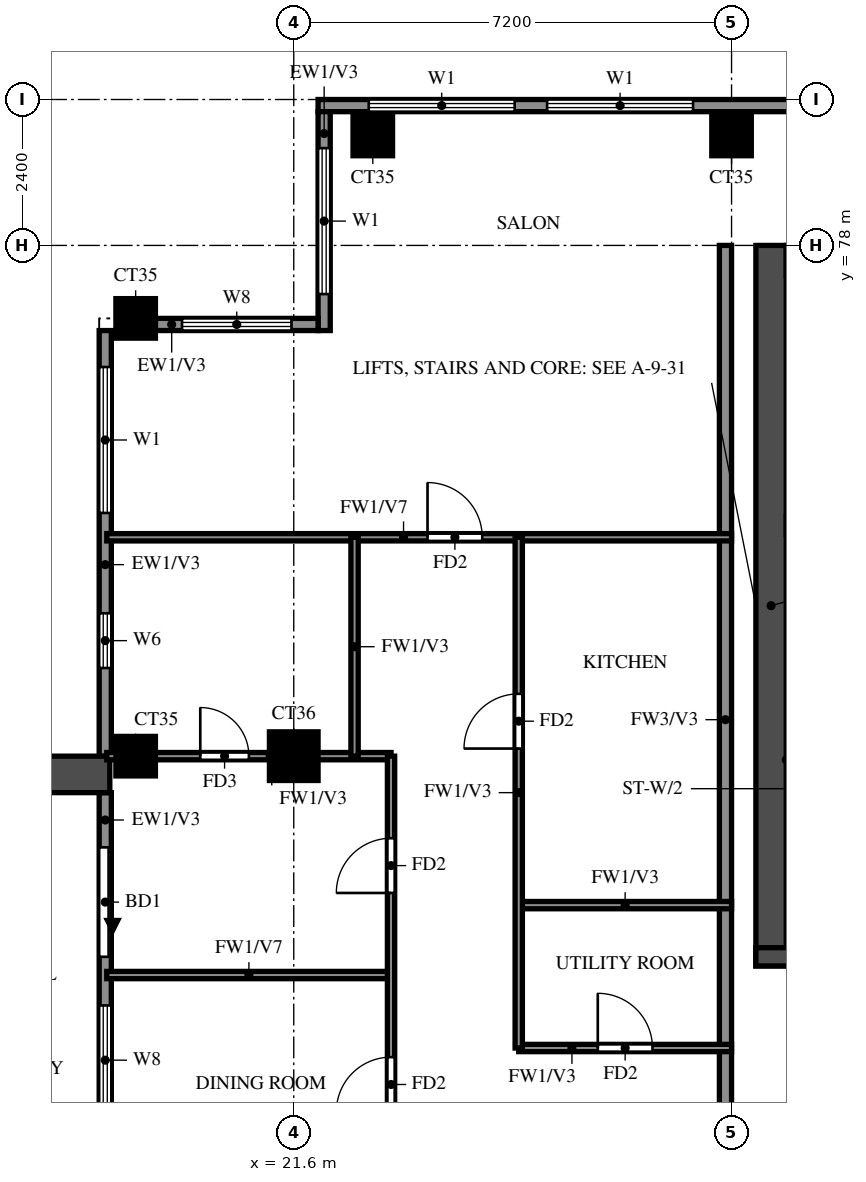
"""IFC4 building model, lengths in metres.
Left out: names, types, materials, properties, quantities, classifications, styles, units other than length and angle.
Written with IfcOpenShell. Run it as: python <this file> out.ifc"""

import sys

from ifc_helpers import new_model, si_unit, direction, frame, frame_2d, origin, origin_2d, place, context, subcontext, project, spatial, rectangle, extrude, source, transform, mapped, element, fill, save


model = new_model("IFC4")
c1 = context("Model", 3, precision=1e-05, world=origin(), true_north=direction((0.0, 1.0)))
c2 = subcontext(c1, "Body", "Model", "MODEL_VIEW")
j1 = project(units=[si_unit("LENGTHUNIT", "METRE"), si_unit("PLANEANGLEUNIT", "RADIAN")], contexts=[c1])
p1 = place(None, origin())
s1 = spatial("IfcSite", under=j1, at=p1, CompositionType="ELEMENT")
p2 = place(p1, origin())
s2 = spatial("IfcBuilding", under=s1, at=p2, CompositionType="ELEMENT")
p3 = place(p2, frame((0.0, 0.0, 246.5)))
s3 = spatial("IfcBuildingStorey", under=s2, at=p3, CompositionType="ELEMENT", Elevation=246.5)
m1 = source(origin(), c2, "Body", "SweptSolid", [
    extrude(rectangle(XDim=0.65, YDim=0.65, at=origin_2d()), origin(), (0.0, 0.0, 1.0), 3.22),
])
p4 = place(p3, frame((19.0, 69.6, 0.0), z_axis=(0.0, 0.0, 1.0), x_axis=(1.0, 0.0, 0.0)))
e1 = element("IfcColumn", 1, at=p4, inside=s3, PredefinedType="COLUMN", context=c2, shape_type="MappedRepresentation", body=[
    mapped(m1, transform((0.0, 0.0, 0.0))),
])
m2 = source(origin(), c2, "Body", "SweptSolid", [
    extrude(rectangle(XDim=0.8, YDim=0.8, at=origin_2d()), origin(), (0.0, 0.0, 1.0), 3.22),
])
p5 = place(p3, frame((21.6, 69.6, 0.0), z_axis=(0.0, 0.0, 1.0), x_axis=(1.0, 0.0, 0.0)))
e2 = element("IfcColumn", 2, at=p5, inside=s3, PredefinedType="COLUMN", context=c2, shape_type="MappedRepresentation", body=[
    mapped(m2, transform((0.0, 0.0, 0.0))),
])
for number, where, z_axis, x_axis in (
    (3, (19.0, 76.8, 0.0), (0.0, 0.0, 1.0), (1.0, 0.0, 0.0)),
    (4, (22.9, 79.8, 0.0), (0.0, 0.0, 1.0), (1.0, 0.0, 0.0)),
    (5, (28.8, 79.8, 0.0), (0.0, 0.0, 1.0), (1.0, 0.0, 0.0)),
):
    element("IfcColumn", number, at=place(p3, frame(where, z_axis=z_axis, x_axis=x_axis)), inside=s3, PredefinedType="COLUMN", context=c2, shape_type="MappedRepresentation", body=[
        mapped(m1, transform((0.0, 0.0, 0.0))),
    ])
p6 = place(p3, frame((29.45, 66.15, 0.0), z_axis=(0.0, 0.0, 1.0), x_axis=(0.0, 1.0, 0.0)))
e6 = element("IfcWall", 6, at=p6, inside=s3, PredefinedType="SHEAR", context=c2, shape_type="SweptSolid", body=[
    extrude(rectangle(XDim=11.85, YDim=0.5, at=frame_2d((5.925, 0.0))), origin(), (0.0, 0.0, 1.0), 3.22),
])
p7 = place(p3, frame((29.2, 66.3, 0.0), z_axis=(0.0, 0.0, 1.0), x_axis=(1.0, 0.0, 0.0)))
e7 = element("IfcWall", 7, at=p7, inside=s3, PredefinedType="SHEAR", context=c2, shape_type="SweptSolid", body=[
    extrude(rectangle(XDim=42.4, YDim=0.3, at=frame_2d((21.2, 0.0))), origin(), (0.0, 0.0, 1.0), 3.22),
])
p8 = place(p7, frame((1.425, 0.0, 0.0)))
e8 = element("IfcOpeningElement", 8, at=p8, cuts=e7, PredefinedType="OPENING", context=c2, shape_type="SweptSolid", body=[
    extrude(rectangle(XDim=1.1, YDim=2.1, at=frame_2d((0.55, 1.05))), frame((0.0, 0.16, 0.0), z_axis=(0.0, -1.0, 0.0), x_axis=(1.0, 0.0, 0.0)), (0.0, 0.0, 1.0), 0.32),
])
p9 = place(p7, frame((4.2, 0.0, 0.0)))
e9 = element("IfcOpeningElement", 9, at=p9, cuts=e7, PredefinedType="OPENING", context=c2, shape_type="SweptSolid", body=[
    extrude(rectangle(XDim=1.8, YDim=2.1, at=frame_2d((0.9, 1.05))), frame((0.0, 0.16, 0.0), z_axis=(0.0, -1.0, 0.0), x_axis=(1.0, 0.0, 0.0)), (0.0, 0.0, 1.0), 0.32),
])
p10 = place(p3, frame((78.6, 80.3, 0.0), z_axis=(0.0, 0.0, 1.0), x_axis=(-1.0, 0.0, 0.0)))
e10 = element("IfcWall", 10, at=p10, inside=s3, PredefinedType="SOLIDWALL", context=c2, shape_type="SweptSolid", body=[
    extrude(rectangle(XDim=56.6, YDim=0.2, at=frame_2d((28.3, 0.0))), origin(), (0.0, 0.0, 1.0), 3.22),
])
p11 = place(p10, frame((50.433, 0.0, 0.6)))
e11 = element("IfcOpeningElement", 11, at=p11, cuts=e10, PredefinedType="OPENING", context=c2, shape_type="SweptSolid", body=[
    extrude(rectangle(XDim=2.4, YDim=2.4, at=frame_2d((1.2, 1.2))), frame((0.0, 0.11, 0.0), z_axis=(0.0, -1.0, 0.0), x_axis=(1.0, 0.0, 0.0)), (0.0, 0.0, 1.0), 0.22),
])
p12 = place(p10, frame((53.367, 0.0, 0.6)))
e12 = element("IfcOpeningElement", 12, at=p12, cuts=e10, PredefinedType="OPENING", context=c2, shape_type="SweptSolid", body=[
    extrude(rectangle(XDim=2.4, YDim=2.4, at=frame_2d((1.2, 1.2))), frame((0.0, 0.11, 0.0), z_axis=(0.0, -1.0, 0.0), x_axis=(1.0, 0.0, 0.0)), (0.0, 0.0, 1.0), 0.22),
])
p13 = place(p10, frame((0.767, 0.0, 0.6)))
e13 = element("IfcOpeningElement", 13, at=p13, cuts=e10, PredefinedType="OPENING", context=c2, shape_type="SweptSolid", body=[
    extrude(rectangle(XDim=2.4, YDim=2.4, at=frame_2d((1.2, 1.2))), frame((0.0, 0.11, 0.0), z_axis=(0.0, -1.0, 0.0), x_axis=(1.0, 0.0, 0.0)), (0.0, 0.0, 1.0), 0.22),
])
p14 = place(p10, frame((3.633, 0.0, 0.6)))
e14 = element("IfcOpeningElement", 14, at=p14, cuts=e10, PredefinedType="OPENING", context=c2, shape_type="SweptSolid", body=[
    extrude(rectangle(XDim=2.4, YDim=2.4, at=frame_2d((1.2, 1.2))), frame((0.0, 0.11, 0.0), z_axis=(0.0, -1.0, 0.0), x_axis=(1.0, 0.0, 0.0)), (0.0, 0.0, 1.0), 0.22),
])
p15 = place(p3, frame((22.1, 80.2, 0.0), z_axis=(0.0, 0.0, 1.0), x_axis=(0.0, -1.0, 0.0)))
e15 = element("IfcWall", 15, at=p15, inside=s3, PredefinedType="SOLIDWALL", context=c2, shape_type="SweptSolid", body=[
    extrude(rectangle(XDim=3.6, YDim=0.2, at=frame_2d((1.8, 0.0))), origin(), (0.0, 0.0, 1.0), 3.22),
])
p16 = place(p15, frame((0.6, 0.0, 0.6)))
e16 = element("IfcOpeningElement", 16, at=p16, cuts=e15, PredefinedType="OPENING", context=c2, shape_type="SweptSolid", body=[
    extrude(rectangle(XDim=2.4, YDim=2.4, at=frame_2d((1.2, 1.2))), frame((0.0, 0.11, 0.0), z_axis=(0.0, -1.0, 0.0), x_axis=(1.0, 0.0, 0.0)), (0.0, 0.0, 1.0), 0.22),
])
p17 = place(p3, frame((22.0, 76.7, 0.0), z_axis=(0.0, 0.0, 1.0), x_axis=(-1.0, 0.0, 0.0)))
e17 = element("IfcWall", 17, at=p17, inside=s3, PredefinedType="SOLIDWALL", context=c2, shape_type="SweptSolid", body=[
    extrude(rectangle(XDim=2.675, YDim=0.2, at=frame_2d((1.337, 0.0))), origin(), (0.0, 0.0, 1.0), 3.22),
])
p18 = place(p17, frame((0.438, 0.0, 0.6)))
e18 = element("IfcOpeningElement", 18, at=p18, cuts=e17, PredefinedType="OPENING", context=c2, shape_type="SweptSolid", body=[
    extrude(rectangle(XDim=1.8, YDim=2.4, at=frame_2d((0.9, 1.2))), frame((0.0, 0.11, 0.0), z_axis=(0.0, -1.0, 0.0), x_axis=(1.0, 0.0, 0.0)), (0.0, 0.0, 1.0), 0.22),
])
p19 = place(p3, frame((18.5, 76.6, 0.0), z_axis=(0.0, 0.0, 1.0), x_axis=(0.0, -1.0, 0.0)))
e19 = element("IfcWall", 19, at=p19, inside=s3, PredefinedType="SOLIDWALL", context=c2, shape_type="SweptSolid", body=[
    extrude(rectangle(XDim=7.0, YDim=0.2, at=frame_2d((3.5, 0.0))), origin(), (0.0, 0.0, 1.0), 3.22),
])
p20 = place(p19, frame((4.65, 0.0, 1.5)))
e20 = element("IfcOpeningElement", 20, at=p20, cuts=e19, PredefinedType="OPENING", context=c2, shape_type="SweptSolid", body=[
    extrude(rectangle(XDim=0.9, YDim=0.9, at=frame_2d((0.45, 0.45))), frame((0.0, 0.11, 0.0), z_axis=(0.0, -1.0, 0.0), x_axis=(1.0, 0.0, 0.0)), (0.0, 0.0, 1.0), 0.22),
])
p21 = place(p19, frame((0.6, 0.0, 0.6)))
e21 = element("IfcOpeningElement", 21, at=p21, cuts=e19, PredefinedType="OPENING", context=c2, shape_type="SweptSolid", body=[
    extrude(rectangle(XDim=2.4, YDim=2.4, at=frame_2d((1.2, 1.2))), frame((0.0, 0.11, 0.0), z_axis=(0.0, -1.0, 0.0), x_axis=(1.0, 0.0, 0.0)), (0.0, 0.0, 1.0), 0.22),
])
p22 = place(p3, frame((18.5, 69.0, 0.0), z_axis=(0.0, 0.0, 1.0), x_axis=(0.0, -1.0, 0.0)))
e22 = element("IfcWall", 22, at=p22, inside=s3, PredefinedType="SOLIDWALL", context=c2, shape_type="SweptSolid", body=[
    extrude(rectangle(XDim=6.0, YDim=0.2, at=frame_2d((3.0, 0.0))), origin(), (0.0, 0.0, 1.0), 3.22),
])
p23 = place(p22, frame((0.9, 0.0, 0.0)))
e23 = element("IfcOpeningElement", 23, at=p23, cuts=e22, PredefinedType="OPENING", context=c2, shape_type="SweptSolid", body=[
    extrude(rectangle(XDim=1.8, YDim=2.4, at=frame_2d((0.9, 1.2))), frame((0.0, 0.11, 0.0), z_axis=(0.0, -1.0, 0.0), x_axis=(1.0, 0.0, 0.0)), (0.0, 0.0, 1.0), 0.22),
])
p24 = place(p22, frame((3.5, 0.0, 0.6)))
e24 = element("IfcOpeningElement", 24, at=p24, cuts=e22, PredefinedType="OPENING", context=c2, shape_type="SweptSolid", body=[
    extrude(rectangle(XDim=1.8, YDim=2.4, at=frame_2d((0.9, 1.2))), frame((0.0, 0.11, 0.0), z_axis=(0.0, -1.0, 0.0), x_axis=(1.0, 0.0, 0.0)), (0.0, 0.0, 1.0), 0.22),
])
p25 = place(p3, frame((18.575, 69.3, 0.0), z_axis=(0.0, 0.0, 1.0), x_axis=(-1.0, 0.0, 0.0)))
e25 = element("IfcWall", 25, at=p25, inside=s3, PredefinedType="SOLIDWALL", context=c2, shape_type="SweptSolid", body=[
    extrude(rectangle(XDim=2.875, YDim=0.6, at=frame_2d((1.438, 0.0))), origin(), (0.0, 0.0, 1.0), 2.85),
])
p26 = place(p3, frame((28.7, 62.4, 0.0), z_axis=(0.0, 0.0, 1.0), x_axis=(0.0, 1.0, 0.0)))
e26 = element("IfcWall", 26, at=p26, inside=s3, PredefinedType="SOLIDWALL", context=c2, shape_type="SweptSolid", body=[
    extrude(rectangle(XDim=15.6, YDim=0.2, at=frame_2d((7.8, 0.0))), origin(), (0.0, 0.0, 1.0), 3.22),
])
p27 = place(p3, frame((25.3, 64.8, 0.0), z_axis=(0.0, 0.0, 1.0), x_axis=(1.0, 0.0, 0.0)))
e27 = element("IfcWall", 27, at=p27, inside=s3, PredefinedType="PARTITIONING", context=c2, shape_type="SweptSolid", body=[
    extrude(rectangle(XDim=3.5, YDim=0.12, at=frame_2d((1.75, 0.0))), origin(), (0.0, 0.0, 1.0), 3.22),
])
p28 = place(p27, frame((1.3, 0.0, 0.0)))
e28 = element("IfcOpeningElement", 28, at=p28, cuts=e27, PredefinedType="OPENING", context=c2, shape_type="SweptSolid", body=[
    extrude(rectangle(XDim=0.9, YDim=2.1, at=frame_2d((0.45, 1.05))), frame((0.0, 0.07, 0.0), z_axis=(0.0, -1.0, 0.0), x_axis=(1.0, 0.0, 0.0)), (0.0, 0.0, 1.0), 0.14),
])
p29 = place(p3, frame((18.525, 66.0, 0.0), z_axis=(0.0, 0.0, 1.0), x_axis=(1.0, 0.0, 0.0)))
e29 = element("IfcWall", 29, at=p29, inside=s3, PredefinedType="PARTITIONING", context=c2, shape_type="SweptSolid", body=[
    extrude(rectangle(XDim=4.675, YDim=0.12, at=frame_2d((2.337, 0.0))), origin(), (0.0, 0.0, 1.0), 2.32),
])
p30 = place(p3, frame((25.3, 67.15, 0.0), z_axis=(0.0, 0.0, 1.0), x_axis=(1.0, 0.0, 0.0)))
e30 = element("IfcWall", 30, at=p30, inside=s3, PredefinedType="PARTITIONING", context=c2, shape_type="SweptSolid", body=[
    extrude(rectangle(XDim=3.5, YDim=0.12, at=frame_2d((1.75, 0.0))), origin(), (0.0, 0.0, 1.0), 3.22),
])
p31 = place(p3, frame((18.525, 69.6, 0.0), z_axis=(0.0, 0.0, 1.0), x_axis=(1.0, 0.0, 0.0)))
e31 = element("IfcWall", 31, at=p31, inside=s3, PredefinedType="PARTITIONING", context=c2, shape_type="SweptSolid", body=[
    extrude(rectangle(XDim=4.675, YDim=0.12, at=frame_2d((2.337, 0.0))), origin(), (0.0, 0.0, 1.0), 3.22),
])
p32 = place(p31, frame((1.538, 0.0, 0.0)))
e32 = element("IfcOpeningElement", 32, at=p32, cuts=e31, PredefinedType="OPENING", context=c2, shape_type="SweptSolid", body=[
    extrude(rectangle(XDim=0.8, YDim=2.1, at=frame_2d((0.4, 1.05))), frame((0.0, 0.07, 0.0), z_axis=(0.0, -1.0, 0.0), x_axis=(1.0, 0.0, 0.0)), (0.0, 0.0, 1.0), 0.14),
])
p33 = place(p3, frame((18.525, 73.2, 0.0), z_axis=(0.0, 0.0, 1.0), x_axis=(1.0, 0.0, 0.0)))
e33 = element("IfcWall", 33, at=p33, inside=s3, PredefinedType="PARTITIONING", context=c2, shape_type="SweptSolid", body=[
    extrude(rectangle(XDim=10.275, YDim=0.12, at=frame_2d((5.138, 0.0))), origin(), (0.0, 0.0, 1.0), 2.32),
])
p34 = place(p33, frame((5.275, 0.0, 0.0)))
e34 = element("IfcOpeningElement", 34, at=p34, cuts=e33, PredefinedType="OPENING", context=c2, shape_type="SweptSolid", body=[
    extrude(rectangle(XDim=0.9, YDim=2.1, at=frame_2d((0.45, 1.05))), frame((0.0, 0.07, 0.0), z_axis=(0.0, -1.0, 0.0), x_axis=(1.0, 0.0, 0.0)), (0.0, 0.0, 1.0), 0.14),
])
p35 = place(p3, frame((22.6, 69.6, 0.0), z_axis=(0.0, 0.0, 1.0), x_axis=(0.0, 1.0, 0.0)))
e35 = element("IfcWall", 35, at=p35, inside=s3, PredefinedType="PARTITIONING", context=c2, shape_type="SweptSolid", body=[
    extrude(rectangle(XDim=3.6, YDim=0.12, at=frame_2d((1.8, 0.0))), origin(), (0.0, 0.0, 1.0), 3.22),
])
p36 = place(p3, frame((23.2, 48.0, 0.0), z_axis=(0.0, 0.0, 1.0), x_axis=(0.0, 1.0, 0.0)))
e36 = element("IfcWall", 36, at=p36, inside=s3, PredefinedType="PARTITIONING", context=c2, shape_type="SweptSolid", body=[
    extrude(rectangle(XDim=21.6, YDim=0.12, at=frame_2d((10.8, 0.0))), origin(), (0.0, 0.0, 1.0), 3.22),
])
p37 = place(p36, frame((1.35, 0.0, 0.0)))
e37 = element("IfcOpeningElement", 37, at=p37, cuts=e36, PredefinedType="OPENING", context=c2, shape_type="SweptSolid", body=[
    extrude(rectangle(XDim=0.9, YDim=2.1, at=frame_2d((0.45, 1.05))), frame((0.0, 0.07, 0.0), z_axis=(0.0, -1.0, 0.0), x_axis=(1.0, 0.0, 0.0)), (0.0, 0.0, 1.0), 0.14),
])
p38 = place(p36, frame((7.95, 0.0, 0.0)))
e38 = element("IfcOpeningElement", 38, at=p38, cuts=e36, PredefinedType="OPENING", context=c2, shape_type="SweptSolid", body=[
    extrude(rectangle(XDim=1.5, YDim=2.1, at=frame_2d((0.75, 1.05))), frame((0.0, 0.07, 0.0), z_axis=(0.0, -1.0, 0.0), x_axis=(1.0, 0.0, 0.0)), (0.0, 0.0, 1.0), 0.14),
])
p39 = place(p36, frame((12.15, 0.0, 0.0)))
e39 = element("IfcOpeningElement", 39, at=p39, cuts=e36, PredefinedType="OPENING", context=c2, shape_type="SweptSolid", body=[
    extrude(rectangle(XDim=0.9, YDim=2.1, at=frame_2d((0.45, 1.05))), frame((0.0, 0.07, 0.0), z_axis=(0.0, -1.0, 0.0), x_axis=(1.0, 0.0, 0.0)), (0.0, 0.0, 1.0), 0.14),
])
p40 = place(p36, frame((15.75, 0.0, 0.0)))
e40 = element("IfcOpeningElement", 40, at=p40, cuts=e36, PredefinedType="OPENING", context=c2, shape_type="SweptSolid", body=[
    extrude(rectangle(XDim=0.9, YDim=2.1, at=frame_2d((0.45, 1.05))), frame((0.0, 0.07, 0.0), z_axis=(0.0, -1.0, 0.0), x_axis=(1.0, 0.0, 0.0)), (0.0, 0.0, 1.0), 0.14),
])
p41 = place(p36, frame((19.35, 0.0, 0.0)))
e41 = element("IfcOpeningElement", 41, at=p41, cuts=e36, PredefinedType="OPENING", context=c2, shape_type="SweptSolid", body=[
    extrude(rectangle(XDim=0.9, YDim=2.1, at=frame_2d((0.45, 1.05))), frame((0.0, 0.07, 0.0), z_axis=(0.0, -1.0, 0.0), x_axis=(1.0, 0.0, 0.0)), (0.0, 0.0, 1.0), 0.14),
])
p42 = place(p3, frame((25.3, 64.8, 0.0), z_axis=(0.0, 0.0, 1.0), x_axis=(0.0, 1.0, 0.0)))
e42 = element("IfcWall", 42, at=p42, inside=s3, PredefinedType="PARTITIONING", context=c2, shape_type="SweptSolid", body=[
    extrude(rectangle(XDim=8.4, YDim=0.12, at=frame_2d((4.2, 0.0))), origin(), (0.0, 0.0, 1.0), 3.22),
])
p43 = place(p42, frame((4.925, 0.0, 0.0)))
e43 = element("IfcOpeningElement", 43, at=p43, cuts=e42, PredefinedType="OPENING", context=c2, shape_type="SweptSolid", body=[
    extrude(rectangle(XDim=0.9, YDim=2.1, at=frame_2d((0.45, 1.05))), frame((0.0, 0.07, 0.0), z_axis=(0.0, -1.0, 0.0), x_axis=(1.0, 0.0, 0.0)), (0.0, 0.0, 1.0), 0.14),
])
p44 = place(p11, origin())
e44 = element("IfcWindow", 44, at=p44, inside=s3, PartitioningType="DOUBLE_PANEL_VERTICAL", PredefinedType="WINDOW", context=c2, shape_type="SweptSolid", body=[
    extrude(rectangle(XDim=2.4, YDim=2.4, at=frame_2d((1.2, 1.2))), frame((0.0, 0.03, 0.0), z_axis=(0.0, -1.0, 0.0), x_axis=(1.0, 0.0, 0.0)), (0.0, 0.0, 1.0), 0.06),
])
fill(e11, e44)
p45 = place(p12, origin())
e45 = element("IfcWindow", 45, at=p45, inside=s3, PartitioningType="DOUBLE_PANEL_VERTICAL", PredefinedType="WINDOW", context=c2, shape_type="SweptSolid", body=[
    extrude(rectangle(XDim=2.4, YDim=2.4, at=frame_2d((1.2, 1.2))), frame((0.0, 0.03, 0.0), z_axis=(0.0, -1.0, 0.0), x_axis=(1.0, 0.0, 0.0)), (0.0, 0.0, 1.0), 0.06),
])
fill(e12, e45)
p46 = place(p16, origin())
e46 = element("IfcWindow", 46, at=p46, inside=s3, PartitioningType="DOUBLE_PANEL_VERTICAL", PredefinedType="WINDOW", context=c2, shape_type="SweptSolid", body=[
    extrude(rectangle(XDim=2.4, YDim=2.4, at=frame_2d((1.2, 1.2))), frame((0.0, 0.03, 0.0), z_axis=(0.0, -1.0, 0.0), x_axis=(1.0, 0.0, 0.0)), (0.0, 0.0, 1.0), 0.06),
])
fill(e16, e46)
p47 = place(p18, origin())
e47 = element("IfcWindow", 47, at=p47, inside=s3, PartitioningType="DOUBLE_PANEL_VERTICAL", PredefinedType="WINDOW", context=c2, shape_type="SweptSolid", body=[
    extrude(rectangle(XDim=1.8, YDim=2.4, at=frame_2d((0.9, 1.2))), frame((0.0, 0.03, 0.0), z_axis=(0.0, -1.0, 0.0), x_axis=(1.0, 0.0, 0.0)), (0.0, 0.0, 1.0), 0.06),
])
fill(e18, e47)
p48 = place(p20, origin())
e48 = element("IfcWindow", 48, at=p48, inside=s3, PartitioningType="SINGLE_PANEL", PredefinedType="WINDOW", context=c2, shape_type="SweptSolid", body=[
    extrude(rectangle(XDim=0.9, YDim=0.9, at=frame_2d((0.45, 0.45))), frame((0.0, 0.03, 0.0), z_axis=(0.0, -1.0, 0.0), x_axis=(1.0, 0.0, 0.0)), (0.0, 0.0, 1.0), 0.06),
])
fill(e20, e48)
p49 = place(p21, origin())
e49 = element("IfcWindow", 49, at=p49, inside=s3, PartitioningType="DOUBLE_PANEL_VERTICAL", PredefinedType="WINDOW", context=c2, shape_type="SweptSolid", body=[
    extrude(rectangle(XDim=2.4, YDim=2.4, at=frame_2d((1.2, 1.2))), frame((0.0, 0.03, 0.0), z_axis=(0.0, -1.0, 0.0), x_axis=(1.0, 0.0, 0.0)), (0.0, 0.0, 1.0), 0.06),
])
fill(e21, e49)
p50 = place(p23, origin())
e50 = element("IfcDoor", 50, at=p50, inside=s3, OperationType="DOUBLE_DOOR_SLIDING", PredefinedType="DOOR", context=c2, shape_type="SweptSolid", body=[
    extrude(rectangle(XDim=1.8, YDim=2.4, at=frame_2d((0.9, 1.2))), frame((0.0, 0.025, 0.0), z_axis=(0.0, -1.0, 0.0), x_axis=(1.0, 0.0, 0.0)), (0.0, 0.0, 1.0), 0.05),
])
fill(e23, e50)
p51 = place(p24, origin())
e51 = element("IfcWindow", 51, at=p51, inside=s3, PartitioningType="DOUBLE_PANEL_VERTICAL", PredefinedType="WINDOW", context=c2, shape_type="SweptSolid", body=[
    extrude(rectangle(XDim=1.8, YDim=2.4, at=frame_2d((0.9, 1.2))), frame((0.0, 0.03, 0.0), z_axis=(0.0, -1.0, 0.0), x_axis=(1.0, 0.0, 0.0)), (0.0, 0.0, 1.0), 0.06),
])
fill(e24, e51)
p52 = place(p40, origin())
e52 = element("IfcDoor", 52, at=p52, inside=s3, OperationType="SINGLE_SWING_RIGHT", PredefinedType="DOOR", context=c2, shape_type="SweptSolid", body=[
    extrude(rectangle(XDim=0.9, YDim=2.1, at=frame_2d((0.45, 1.05))), frame((0.0, 0.025, 0.0), z_axis=(0.0, -1.0, 0.0), x_axis=(1.0, 0.0, 0.0)), (0.0, 0.0, 1.0), 0.05),
])
fill(e40, e52)
p53 = place(p41, origin())
e53 = element("IfcDoor", 53, at=p53, inside=s3, OperationType="SINGLE_SWING_LEFT", PredefinedType="DOOR", context=c2, shape_type="SweptSolid", body=[
    extrude(rectangle(XDim=0.9, YDim=2.1, at=frame_2d((0.45, 1.05))), frame((0.0, 0.025, 0.0), z_axis=(0.0, -1.0, 0.0), x_axis=(1.0, 0.0, 0.0)), (0.0, 0.0, 1.0), 0.05),
])
fill(e41, e53)
p54 = place(p32, origin())
e54 = element("IfcDoor", 54, at=p54, inside=s3, OperationType="SINGLE_SWING_RIGHT", PredefinedType="DOOR", context=c2, shape_type="SweptSolid", body=[
    extrude(rectangle(XDim=0.8, YDim=2.1, at=frame_2d((0.4, 1.05))), frame((0.0, 0.025, 0.0), z_axis=(0.0, -1.0, 0.0), x_axis=(1.0, 0.0, 0.0)), (0.0, 0.0, 1.0), 0.05),
])
fill(e32, e54)
p55 = place(p34, origin())
e55 = element("IfcDoor", 55, at=p55, inside=s3, OperationType="SINGLE_SWING_RIGHT", PredefinedType="DOOR", context=c2, shape_type="SweptSolid", body=[
    extrude(rectangle(XDim=0.9, YDim=2.1, at=frame_2d((0.45, 1.05))), frame((0.0, 0.025, 0.0), z_axis=(0.0, -1.0, 0.0), x_axis=(1.0, 0.0, 0.0)), (0.0, 0.0, 1.0), 0.05),
])
fill(e34, e55)
p56 = place(p28, origin())
e56 = element("IfcDoor", 56, at=p56, inside=s3, OperationType="SINGLE_SWING_LEFT", PredefinedType="DOOR", context=c2, shape_type="SweptSolid", body=[
    extrude(rectangle(XDim=0.9, YDim=2.1, at=frame_2d((0.45, 1.05))), frame((0.0, 0.025, 0.0), z_axis=(0.0, -1.0, 0.0), x_axis=(1.0, 0.0, 0.0)), (0.0, 0.0, 1.0), 0.05),
])
fill(e28, e56)
p57 = place(p43, origin())
e57 = element("IfcDoor", 57, at=p57, inside=s3, OperationType="SINGLE_SWING_LEFT", PredefinedType="DOOR", context=c2, shape_type="SweptSolid", body=[
    extrude(rectangle(XDim=0.9, YDim=2.1, at=frame_2d((0.45, 1.05))), frame((0.0, 0.025, 0.0), z_axis=(0.0, -1.0, 0.0), x_axis=(1.0, 0.0, 0.0)), (0.0, 0.0, 1.0), 0.05),
])
fill(e43, e57)
save(model, sys.argv[1])
